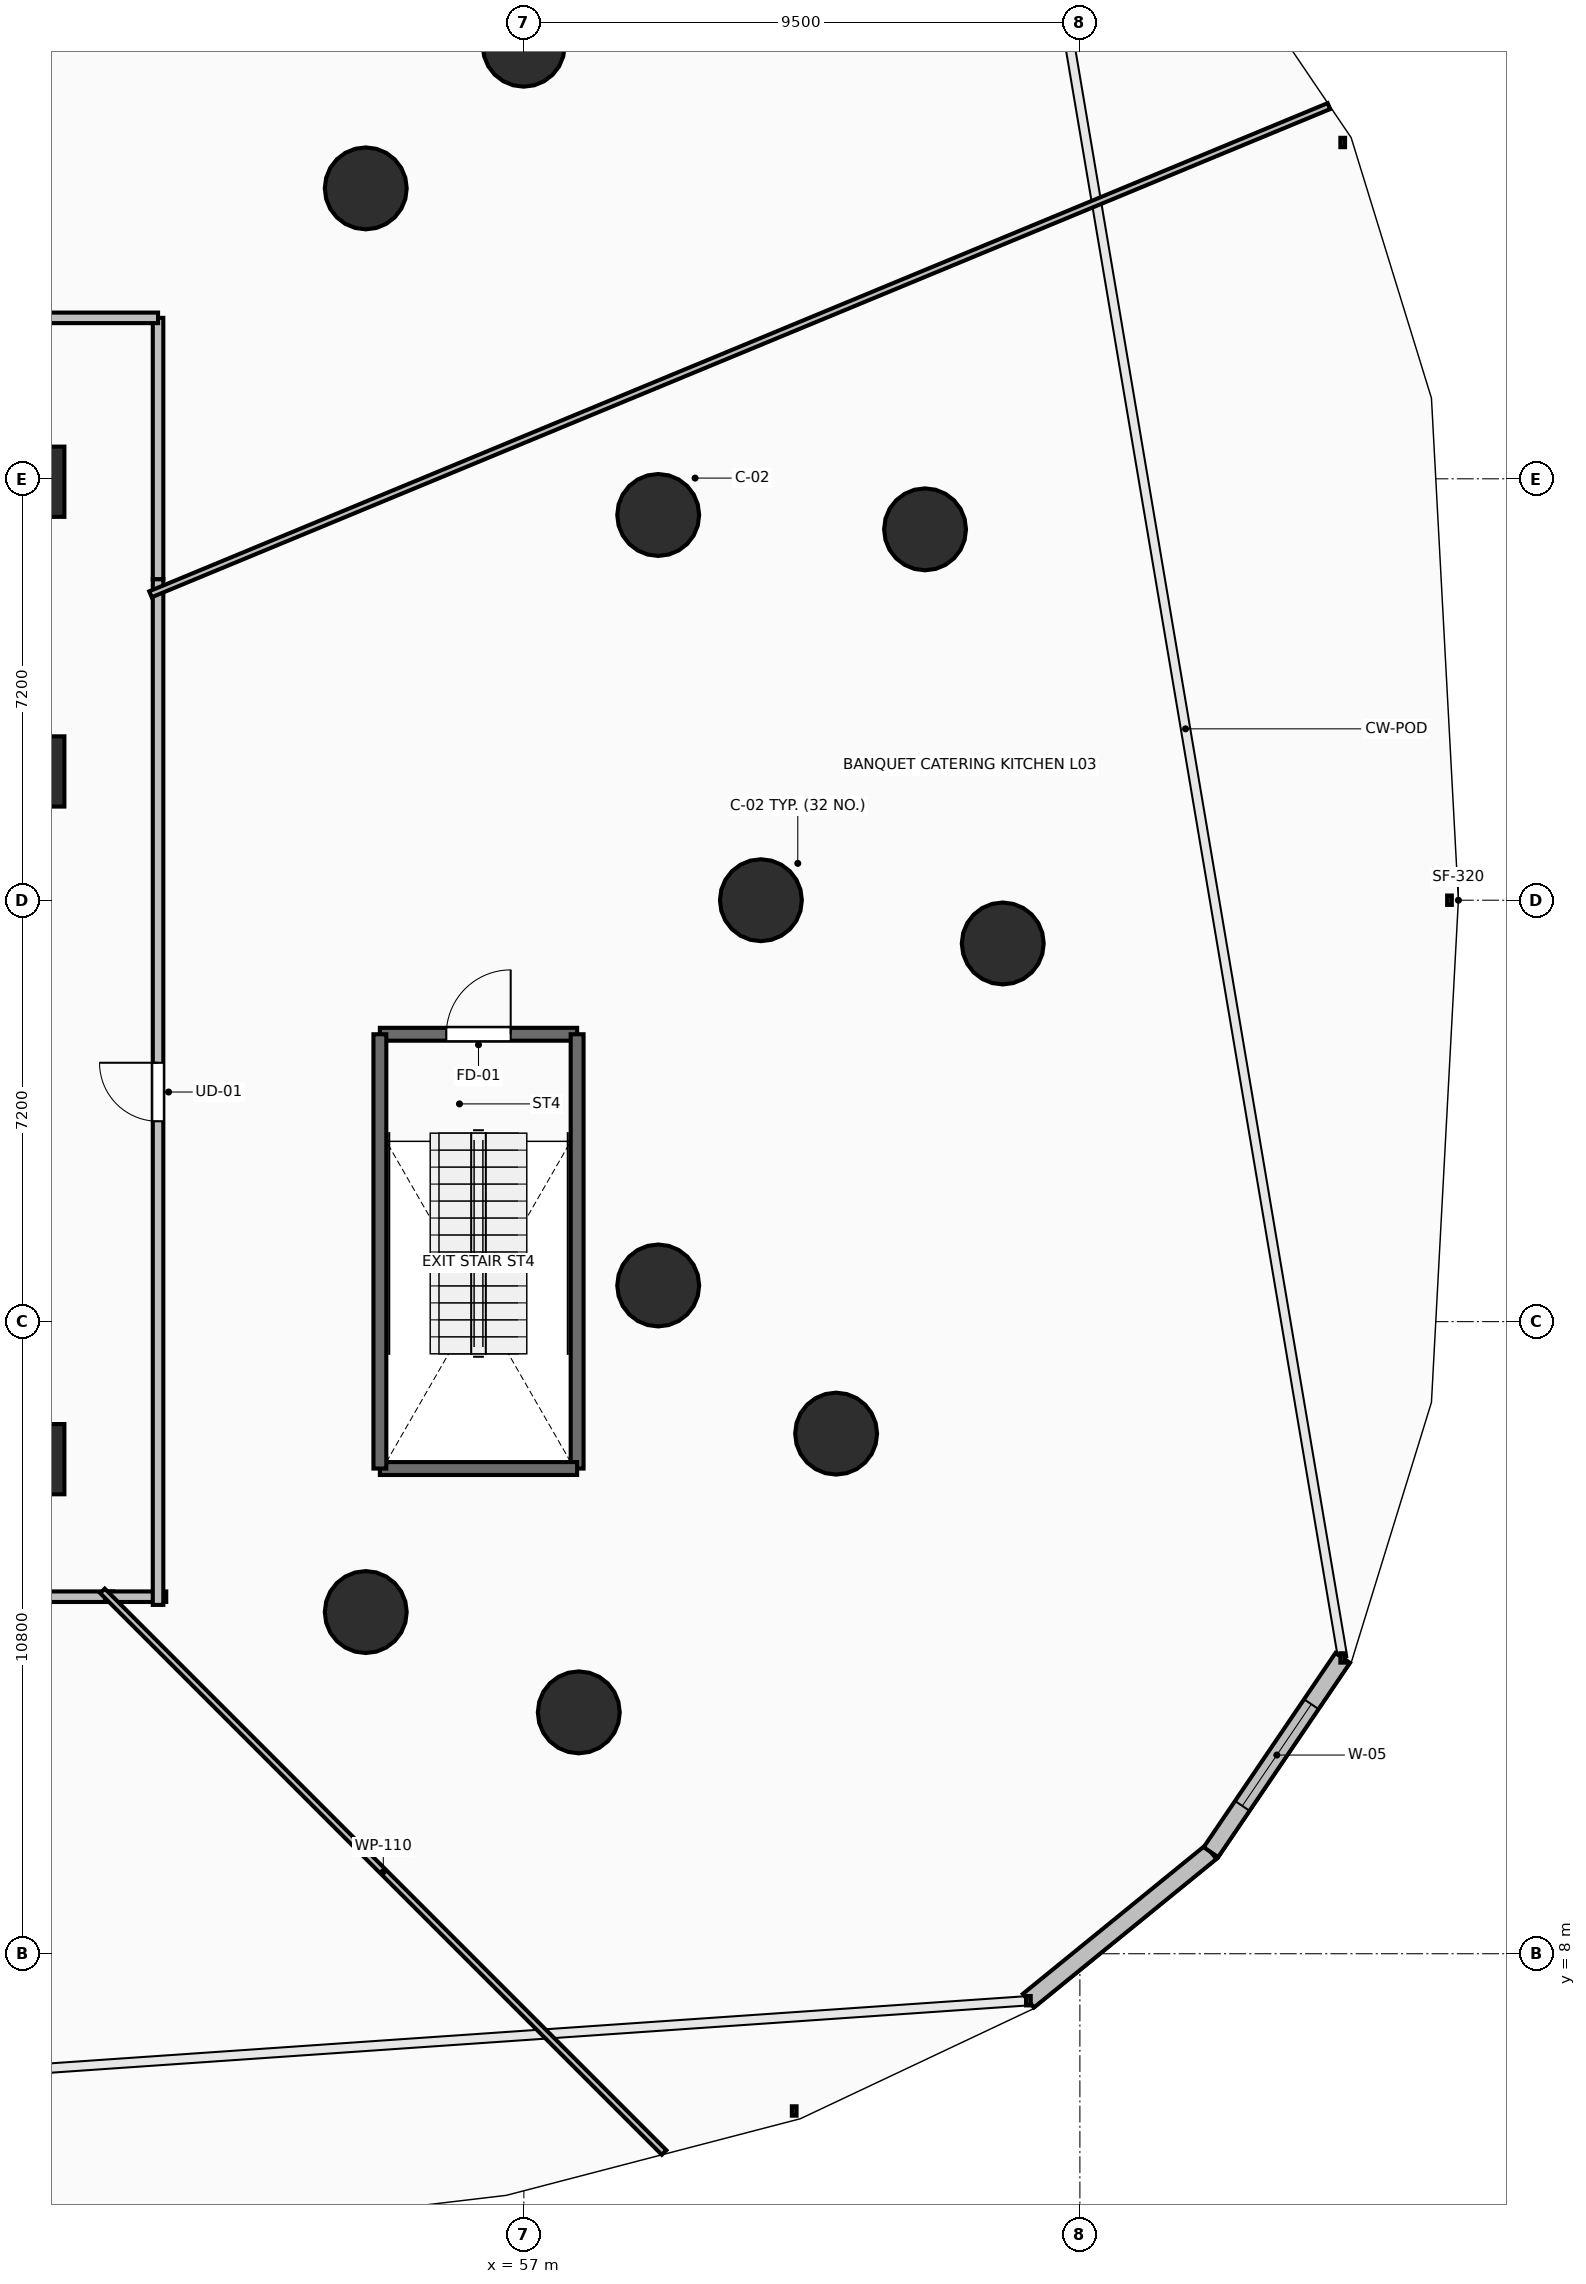
"""IFC4 building model, lengths in metres.
Left out: names, types, materials, properties, quantities, classifications, styles, units other than length and angle.
Written with IfcOpenShell. Run it as: python <this file> out.ifc"""

import sys

from ifc_helpers import new_model, si_unit, direction, frame, frame_2d, origin, origin_2d, place, context, subcontext, project, spatial, rectangle, circle, extrude, element, fill, save


model = new_model("IFC4")
c1 = context("Model", 3, precision=1e-05, world=origin(), true_north=direction((0.0, 1.0)))
c2 = subcontext(c1, "Body", "Model", "MODEL_VIEW")
j1 = project(units=[si_unit("LENGTHUNIT", "METRE"), si_unit("PLANEANGLEUNIT", "RADIAN")], contexts=[c1])
p1 = place(None, origin())
s1 = spatial("IfcSite", under=j1, at=p1, CompositionType="ELEMENT")
p2 = place(p1, origin())
s2 = spatial("IfcBuilding", under=s1, at=p2, CompositionType="ELEMENT")
p3 = place(p2, frame((0.0, 0.0, 14.4)))
s3 = spatial("IfcBuildingStorey", under=s2, at=p3, CompositionType="ELEMENT", Elevation=14.4)
for number, where, z_axis, x_axis in (
    (1, (61.05, 26.0, 0.0), (0.0, 0.0, 1.0), (1.0, 0.0, 0.0)),
    (2, (59.295, 32.582, 0.0), (0.0, 0.0, 1.0), (0.924, 0.383, 0.0)),
    (3, (54.299, 38.162, 0.0), (0.0, 0.0, 1.0), (0.707, 0.707, 0.0)),
    (4, (54.299, 13.838, 0.0), (0.0, 0.0, 1.0), (0.707, -0.707, 0.0)),
    (5, (59.295, 19.418, 0.0), (0.0, 0.0, 1.0), (0.924, -0.383, 0.0)),
    (6, (65.182, 25.261, 0.0), (0.0, 0.0, 1.0), (1.0, 0.0, 0.0)),
    (7, (63.854, 32.337, 0.0), (0.0, 0.0, 1.0), (0.924, 0.383, 0.0)),
    (8, (56.997, 40.6, 0.0), (0.0, 0.0, 1.0), (0.707, 0.707, 0.0)),
    (9, (57.939, 12.124, 0.0), (0.0, 0.0, 1.0), (0.707, -0.707, 0.0)),
    (10, (62.335, 16.886, 0.0), (0.0, 0.0, 1.0), (0.924, -0.383, 0.0)),
):
    element("IfcColumn", number, at=place(p3, frame(where, z_axis=z_axis, x_axis=x_axis)), inside=s3, PredefinedType="COLUMN", context=c2, shape_type="SweptSolid", body=[
        extrude(circle(Radius=0.7, at=origin_2d()), origin(), (0.0, 0.0, 1.0), 4.8),
    ])
for number, where, z_axis, x_axis in (
    (11, (48.75, 33.15, 0.0), (0.0, 0.0, 1.0), (1.0, 0.0, 0.0)),
    (12, (48.75, 28.2, 0.0), (0.0, 0.0, 1.0), (1.0, 0.0, 0.0)),
    (13, (48.75, 16.45, 0.0), (0.0, 0.0, 1.0), (1.0, 0.0, 0.0)),
):
    element("IfcColumn", number, at=place(p3, frame(where, z_axis=z_axis, x_axis=x_axis)), inside=s3, PredefinedType="PILASTER", context=c2, shape_type="SweptSolid", body=[
        extrude(rectangle(XDim=0.8, YDim=1.2, at=origin_2d()), origin(), (0.0, 0.0, 1.0), 4.8),
    ])
p4 = place(p3, frame((65.62, 7.198, 0.0), z_axis=(0.0, 0.0, 1.0), x_axis=(0.775604863632, 0.631218738244, 0.0)))
e14 = element("IfcWall", 14, at=p4, inside=s3, PredefinedType="STANDARD", context=c2, shape_type="SweptSolid", body=[
    extrude(rectangle(XDim=4.021, YDim=0.3, at=frame_2d((2.01, 0.0))), origin(), (0.0, 0.0, 1.0), 4.48),
])
p5 = place(p3, frame((68.739, 9.736, 0.0), z_axis=(0.0, 0.0, 1.0), x_axis=(0.561523750755, 0.827460619811, 0.0)))
e15 = element("IfcWall", 15, at=p5, inside=s3, PredefinedType="STANDARD", context=c2, shape_type="SweptSolid", body=[
    extrude(rectangle(XDim=4.01, YDim=0.3, at=frame_2d((2.005, 0.0))), origin(), (0.0, 0.0, 1.0), 4.48),
])
p6 = place(p5, frame((0.955, 0.0, 0.85)))
e16 = element("IfcOpeningElement", 16, at=p6, cuts=e15, PredefinedType="OPENING", context=c2, shape_type="SweptSolid", body=[
    extrude(rectangle(XDim=2.1, YDim=2.8, at=frame_2d((1.05, 1.4))), frame((0.0, 0.165, 0.0), z_axis=(0.0, -1.0, 0.0), x_axis=(1.0, 0.0, 0.0)), (0.0, 0.0, 1.0), 0.33),
])
p7 = place(p3, frame((54.54, 23.71, 0.0), z_axis=(0.0, 0.0, 1.0), x_axis=(1.0, 0.0, 0.0)))
e17 = element("IfcWall", 17, at=p7, inside=s3, PredefinedType="SOLIDWALL", context=c2, shape_type="SweptSolid", body=[
    extrude(rectangle(XDim=3.37, YDim=0.22, at=frame_2d((1.685, 0.0))), origin(), (0.0, 0.0, 1.0), 4.48),
])
p8 = place(p7, frame((1.135, 0.0, 0.0)))
e18 = element("IfcOpeningElement", 18, at=p8, cuts=e17, PredefinedType="OPENING", context=c2, shape_type="SweptSolid", body=[
    extrude(rectangle(XDim=1.1, YDim=2.15, at=frame_2d((0.55, 1.075))), frame((0.0, 0.125, 0.0), z_axis=(0.0, -1.0, 0.0), x_axis=(1.0, 0.0, 0.0)), (0.0, 0.0, 1.0), 0.25),
])
p9 = place(p3, frame((57.91, 23.71, 0.0), z_axis=(0.0, 0.0, 1.0), x_axis=(0.0, -1.0, 0.0)))
e19 = element("IfcWall", 19, at=p9, inside=s3, PredefinedType="SOLIDWALL", context=c2, shape_type="SweptSolid", body=[
    extrude(rectangle(XDim=7.42, YDim=0.22, at=frame_2d((3.71, 0.0))), origin(), (0.0, 0.0, 1.0), 4.48),
])
p10 = place(p3, frame((57.91, 16.29, 0.0), z_axis=(0.0, 0.0, 1.0), x_axis=(-1.0, 0.0, 0.0)))
e20 = element("IfcWall", 20, at=p10, inside=s3, PredefinedType="SOLIDWALL", context=c2, shape_type="SweptSolid", body=[
    extrude(rectangle(XDim=3.37, YDim=0.22, at=frame_2d((1.685, 0.0))), origin(), (0.0, 0.0, 1.0), 4.48),
])
p11 = place(p3, frame((54.54, 16.29, 0.0), z_axis=(0.0, 0.0, 1.0), x_axis=(0.0, 1.0, 0.0)))
e21 = element("IfcWall", 21, at=p11, inside=s3, PredefinedType="SOLIDWALL", context=c2, shape_type="SweptSolid", body=[
    extrude(rectangle(XDim=7.42, YDim=0.22, at=frame_2d((3.71, 0.0))), origin(), (0.0, 0.0, 1.0), 4.48),
])
p12 = place(p3, frame((42.34, 14.1, 0.0), z_axis=(0.0, 0.0, 1.0), x_axis=(1.0, 0.0, 0.0)))
e22 = element("IfcWall", 22, at=p12, inside=s3, PredefinedType="PARTITIONING", context=c2, shape_type="SweptSolid", body=[
    extrude(rectangle(XDim=7.645, YDim=0.18, at=frame_2d((3.823, 0.0))), origin(), (0.0, 0.0, 1.0), 3.672),
])
p13 = place(p3, frame((49.845, 14.1, 0.0), z_axis=(0.0, 0.0, 1.0), x_axis=(1.0, 0.0, 0.0)))
e23 = element("IfcWall", 23, at=p13, inside=s3, PredefinedType="PARTITIONING", context=c2, shape_type="SweptSolid", body=[
    extrude(rectangle(XDim=1.045, YDim=0.18, at=frame_2d((0.522, 0.0))), origin(), (0.0, 0.0, 1.0), 4.114),
])
p14 = place(p3, frame((50.75, 13.96, 0.0), z_axis=(0.0, 0.0, 1.0), x_axis=(0.0, 1.0, 0.0)))
e24 = element("IfcWall", 24, at=p14, inside=s3, PredefinedType="PARTITIONING", context=c2, shape_type="SweptSolid", body=[
    extrude(rectangle(XDim=17.526, YDim=0.18, at=frame_2d((8.763, 0.0))), origin(), (0.0, 0.0, 1.0), 3.672),
])
p15 = place(p14, frame((8.263, 0.0, 0.0)))
e25 = element("IfcOpeningElement", 25, at=p15, cuts=e24, PredefinedType="OPENING", context=c2, shape_type="SweptSolid", body=[
    extrude(rectangle(XDim=1.0, YDim=2.15, at=frame_2d((0.5, 1.075))), frame((0.0, 0.105, 0.0), z_axis=(0.0, -1.0, 0.0), x_axis=(1.0, 0.0, 0.0)), (0.0, 0.0, 1.0), 0.21),
])
p16 = place(p3, frame((50.75, 31.486, 0.0), z_axis=(0.0, 0.0, 1.0), x_axis=(0.0, 1.0, 0.0)))
e26 = element("IfcWall", 26, at=p16, inside=s3, PredefinedType="PARTITIONING", context=c2, shape_type="SweptSolid", body=[
    extrude(rectangle(XDim=4.464, YDim=0.18, at=frame_2d((2.232, 0.0))), origin(), (0.0, 0.0, 1.0), 3.672),
])
p17 = place(p3, frame((50.75, 35.95, 0.0), z_axis=(0.0, 0.0, 1.0), x_axis=(-1.0, 0.0, 0.0)))
e27 = element("IfcWall", 27, at=p17, inside=s3, PredefinedType="PARTITIONING", context=c2, shape_type="SweptSolid", body=[
    extrude(rectangle(XDim=8.564, YDim=0.18, at=frame_2d((4.282, 0.0))), origin(), (0.0, 0.0, 1.0), 3.672),
])
p18 = place(p17, frame((3.782, 0.0, 0.0)))
e28 = element("IfcOpeningElement", 28, at=p18, cuts=e27, PredefinedType="OPENING", context=c2, shape_type="SweptSolid", body=[
    extrude(rectangle(XDim=1.0, YDim=2.15, at=frame_2d((0.5, 1.075))), frame((0.0, 0.105, 0.0), z_axis=(0.0, -1.0, 0.0), x_axis=(1.0, 0.0, 0.0)), (0.0, 0.0, 1.0), 0.21),
])
p19 = place(p3, frame((59.396, 4.604, 0.0), z_axis=(0.0, 0.0, 1.0), x_axis=(-0.707106781187, 0.707106781187, 0.0)))
e29 = element("IfcWall", 29, at=p19, inside=s3, PredefinedType="PARTITIONING", context=c2, shape_type="SweptSolid", body=[
    extrude(rectangle(XDim=13.569, YDim=0.11, at=frame_2d((6.785, 0.0))), origin(), (0.0, 0.0, 1.0), 3.769),
])
p20 = place(p3, frame((70.754, 39.568, 0.0), z_axis=(0.0, 0.0, 1.0), x_axis=(-0.923869091814, -0.382708637466, 0.0)))
e30 = element("IfcWall", 30, at=p20, inside=s3, PredefinedType="PARTITIONING", context=c2, shape_type="SweptSolid", body=[
    extrude(rectangle(XDim=21.793, YDim=0.11, at=frame_2d((10.896, 0.0))), origin(), (0.0, 0.0, 1.0), 3.672),
])
p21 = place(p6, origin())
e31 = element("IfcWindow", 31, at=p21, inside=s3, PartitioningType="SINGLE_PANEL", PredefinedType="WINDOW", context=c2, shape_type="SweptSolid", body=[
    extrude(rectangle(XDim=2.1, YDim=2.8, at=frame_2d((1.05, 1.4))), frame((0.0, 0.03, 0.0), z_axis=(0.0, -1.0, 0.0), x_axis=(1.0, 0.0, 0.0)), (0.0, 0.0, 1.0), 0.06),
])
fill(e16, e31)
p22 = place(p8, origin())
e32 = element("IfcDoor", 32, at=p22, inside=s3, OperationType="SINGLE_SWING_RIGHT", PredefinedType="DOOR", context=c2, shape_type="SweptSolid", body=[
    extrude(rectangle(XDim=1.1, YDim=2.15, at=frame_2d((0.55, 1.075))), frame((0.0, 0.025, 0.0), z_axis=(0.0, -1.0, 0.0), x_axis=(1.0, 0.0, 0.0)), (0.0, 0.0, 1.0), 0.05),
])
fill(e18, e32)
p23 = place(p15, origin())
e33 = element("IfcDoor", 33, at=p23, inside=s3, OperationType="SINGLE_SWING_RIGHT", PredefinedType="DOOR", context=c2, shape_type="SweptSolid", body=[
    extrude(rectangle(XDim=1.0, YDim=2.15, at=frame_2d((0.5, 1.075))), frame((0.0, 0.025, 0.0), z_axis=(0.0, -1.0, 0.0), x_axis=(1.0, 0.0, 0.0)), (0.0, 0.0, 1.0), 0.05),
])
fill(e25, e33)
save(model, sys.argv[1])
